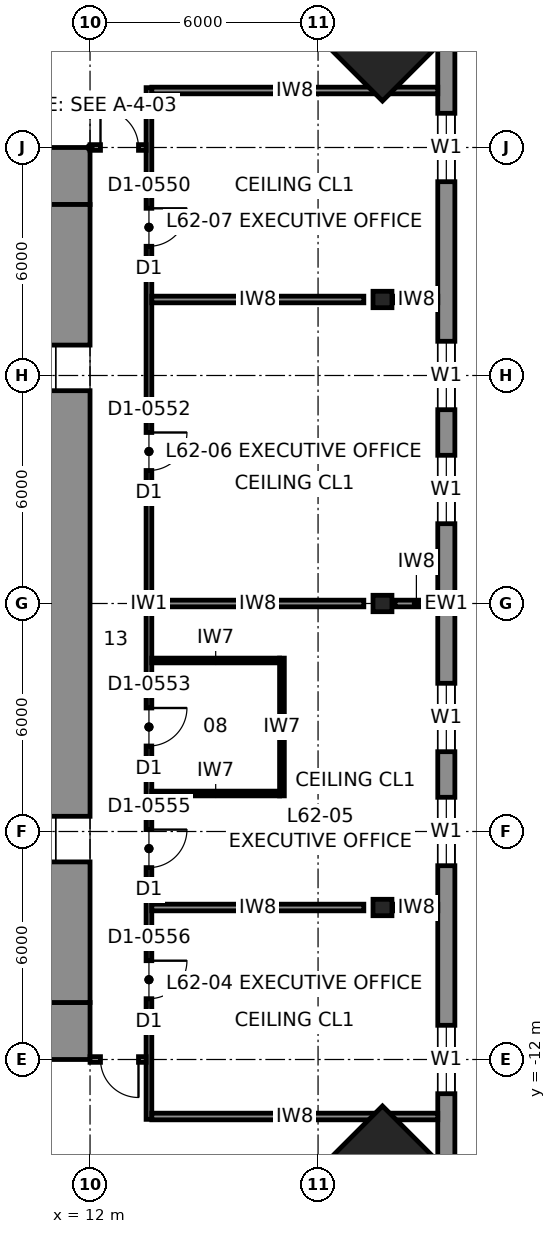
"""IFC4 building model, lengths in metres.
Left out: names, types, materials, properties, quantities, classifications, styles, units other than length and angle.
Written with IfcOpenShell. Run it as: python <this file> out.ifc"""

import sys

from ifc_helpers import new_model, si_unit, direction, frame, frame_2d, origin, origin_2d, place, context, subcontext, project, spatial, rectangle, i_section, extrude, element, fill, save


model = new_model("IFC4")
c1 = context("Model", 3, precision=1e-05, world=origin(), true_north=direction((0.0, 1.0)))
c2 = subcontext(c1, "Body", "Model", "MODEL_VIEW")
j1 = project(units=[si_unit("LENGTHUNIT", "METRE"), si_unit("PLANEANGLEUNIT", "RADIAN")], contexts=[c1])
p1 = place(None, origin())
s1 = spatial("IfcSite", under=j1, at=p1, CompositionType="ELEMENT")
p2 = place(p1, origin())
s2 = spatial("IfcBuilding", under=s1, at=p2, CompositionType="ELEMENT")
p3 = place(p2, frame((0.0, 0.0, 277.8)))
s3 = spatial("IfcBuildingStorey", under=s2, at=p3, CompositionType="ELEMENT", Elevation=277.8)
for number, where, z_axis, x_axis in (
    (1, (19.695, 15.345, 0.0), (-0.04, -0.04, 0.998), (0.708, -0.707, 0.0)),
    (2, (19.695, -15.345, 0.0), (-0.04, 0.04, 0.998), (-0.708, -0.707, 0.0)),
):
    element("IfcColumn", number, at=place(p3, frame(where, z_axis=z_axis, x_axis=x_axis)), inside=s3, PredefinedType="COLUMN", context=c2, shape_type="SweptSolid", body=[
        extrude(rectangle(XDim=3.0, YDim=3.0, at=origin_2d()), origin(), (0.0, 0.0, 1.0), 4.007),
    ])
for number, where, z_axis, x_axis in (
    (3, (19.695, 0.0, 0.0), (-0.04, 0.0, 0.999), (0.0, -1.0, 0.0)),
    (4, (19.695, -8.0, 0.0), (-0.04, 0.0, 0.999), (0.0, -1.0, 0.0)),
    (5, (19.695, 8.0, 0.0), (-0.04, 0.0, 0.999), (0.0, -1.0, 0.0)),
):
    element("IfcColumn", number, at=place(p3, frame(where, z_axis=z_axis, x_axis=x_axis)), inside=s3, PredefinedType="COLUMN", context=c2, shape_type="SweptSolid", body=[
        extrude(i_section(OverallWidth=0.432, OverallDepth=0.498, WebThickness=0.056, FlangeThickness=0.089, at=origin_2d()), origin(), (0.0, 0.0, 1.0), 4.003),
    ])
for number, where, z_axis, x_axis in (
    (6, (-12.0, 11.25, 0.0), (0.0, 0.0, 1.0), (1.0, 0.0, 0.0)),
    (7, (12.0, -11.25, 0.0), (0.0, 0.0, 1.0), (-1.0, 0.0, 0.0)),
):
    element("IfcWall", number, at=place(p3, frame(where, z_axis=z_axis, x_axis=x_axis)), inside=s3, PredefinedType="SHEAR", context=c2, shape_type="SweptSolid", body=[
        extrude(rectangle(XDim=24.0, YDim=1.5, at=frame_2d((12.0, 0.0))), origin(), (0.0, 0.0, 1.0), 4.0),
    ])
p4 = place(p3, frame((11.25, 10.5, 0.0), z_axis=(0.0, 0.0, 1.0), x_axis=(0.0, -1.0, 0.0)))
e8 = element("IfcWall", 8, at=p4, inside=s3, PredefinedType="SHEAR", context=c2, shape_type="SweptSolid", body=[
    extrude(rectangle(XDim=21.0, YDim=1.5, at=frame_2d((10.5, 0.0))), origin(), (0.0, 0.0, 1.0), 4.0),
])
p5 = place(p4, frame((3.7, 0.0, 0.0)))
e9 = element("IfcOpeningElement", 9, at=p5, cuts=e8, PredefinedType="OPENING", context=c2, shape_type="SweptSolid", body=[
    extrude(rectangle(XDim=1.2, YDim=2.3, at=frame_2d((0.6, 1.15))), frame((0.0, 0.76, 0.0), z_axis=(0.0, -1.0, 0.0), x_axis=(1.0, 0.0, 0.0)), (0.0, 0.0, 1.0), 1.52),
])
p6 = place(p4, frame((16.1, 0.0, 0.0)))
e10 = element("IfcOpeningElement", 10, at=p6, cuts=e8, PredefinedType="OPENING", context=c2, shape_type="SweptSolid", body=[
    extrude(rectangle(XDim=1.2, YDim=2.3, at=frame_2d((0.6, 1.15))), frame((0.0, 0.76, 0.0), z_axis=(0.0, -1.0, 0.0), x_axis=(1.0, 0.0, 0.0)), (0.0, 0.0, 1.0), 1.52),
])
p7 = place(p3, frame((21.375, -17.1, 0.0), z_axis=(0.0, 0.0, 1.0), x_axis=(0.0, 1.0, 0.0)))
e11 = element("IfcWall", 11, at=p7, inside=s3, PredefinedType="SOLIDWALL", context=c2, shape_type="SweptSolid", body=[
    extrude(rectangle(XDim=34.2, YDim=0.45, at=frame_2d((17.1, 0.0))), origin(), (0.0, 0.0, 1.0), 3.83),
])
p8 = place(p7, frame((4.2, 0.0, 0.7)))
e12 = element("IfcOpeningElement", 12, at=p8, cuts=e11, PredefinedType="OPENING", context=c2, shape_type="SweptSolid", body=[
    extrude(rectangle(XDim=1.8, YDim=2.6, at=frame_2d((0.9, 1.3))), frame((0.0, 0.235, 0.0), z_axis=(0.0, -1.0, 0.0), x_axis=(1.0, 0.0, 0.0)), (0.0, 0.0, 1.0), 0.47),
])
p9 = place(p7, frame((10.2, 0.0, 0.7)))
e13 = element("IfcOpeningElement", 13, at=p9, cuts=e11, PredefinedType="OPENING", context=c2, shape_type="SweptSolid", body=[
    extrude(rectangle(XDim=1.8, YDim=2.6, at=frame_2d((0.9, 1.3))), frame((0.0, 0.235, 0.0), z_axis=(0.0, -1.0, 0.0), x_axis=(1.0, 0.0, 0.0)), (0.0, 0.0, 1.0), 0.47),
])
p10 = place(p7, frame((13.2, 0.0, 0.7)))
e14 = element("IfcOpeningElement", 14, at=p10, cuts=e11, PredefinedType="OPENING", context=c2, shape_type="SweptSolid", body=[
    extrude(rectangle(XDim=1.8, YDim=2.6, at=frame_2d((0.9, 1.3))), frame((0.0, 0.235, 0.0), z_axis=(0.0, -1.0, 0.0), x_axis=(1.0, 0.0, 0.0)), (0.0, 0.0, 1.0), 0.47),
])
p11 = place(p7, frame((19.2, 0.0, 0.7)))
e15 = element("IfcOpeningElement", 15, at=p11, cuts=e11, PredefinedType="OPENING", context=c2, shape_type="SweptSolid", body=[
    extrude(rectangle(XDim=1.8, YDim=2.6, at=frame_2d((0.9, 1.3))), frame((0.0, 0.235, 0.0), z_axis=(0.0, -1.0, 0.0), x_axis=(1.0, 0.0, 0.0)), (0.0, 0.0, 1.0), 0.47),
])
p12 = place(p7, frame((22.2, 0.0, 0.7)))
e16 = element("IfcOpeningElement", 16, at=p12, cuts=e11, PredefinedType="OPENING", context=c2, shape_type="SweptSolid", body=[
    extrude(rectangle(XDim=1.8, YDim=2.6, at=frame_2d((0.9, 1.3))), frame((0.0, 0.235, 0.0), z_axis=(0.0, -1.0, 0.0), x_axis=(1.0, 0.0, 0.0)), (0.0, 0.0, 1.0), 0.47),
])
p13 = place(p7, frame((28.2, 0.0, 0.7)))
e17 = element("IfcOpeningElement", 17, at=p13, cuts=e11, PredefinedType="OPENING", context=c2, shape_type="SweptSolid", body=[
    extrude(rectangle(XDim=1.8, YDim=2.6, at=frame_2d((0.9, 1.3))), frame((0.0, 0.235, 0.0), z_axis=(0.0, -1.0, 0.0), x_axis=(1.0, 0.0, 0.0)), (0.0, 0.0, 1.0), 0.47),
])
p14 = place(p3, frame((13.55, -13.575, 0.0), z_axis=(0.0, 0.0, 1.0), x_axis=(0.0, 1.0, 0.0)))
e18 = element("IfcWall", 18, at=p14, inside=s3, PredefinedType="PARTITIONING", context=c2, shape_type="SweptSolid", body=[
    extrude(rectangle(XDim=27.15, YDim=0.15, at=frame_2d((13.575, 0.0))), origin(), (0.0, 0.0, 1.0), 3.83),
])
p15 = place(p14, frame((3.175, 0.0, 0.0)))
e19 = element("IfcOpeningElement", 19, at=p15, cuts=e18, PredefinedType="OPENING", context=c2, shape_type="SweptSolid", body=[
    extrude(rectangle(XDim=1.0, YDim=2.3, at=frame_2d((0.5, 1.15))), frame((0.0, 0.085, 0.0), z_axis=(0.0, -1.0, 0.0), x_axis=(1.0, 0.0, 0.0)), (0.0, 0.0, 1.0), 0.17),
])
p16 = place(p14, frame((6.625, 0.0, 0.0)))
e20 = element("IfcOpeningElement", 20, at=p16, cuts=e18, PredefinedType="OPENING", context=c2, shape_type="SweptSolid", body=[
    extrude(rectangle(XDim=1.0, YDim=2.3, at=frame_2d((0.5, 1.15))), frame((0.0, 0.085, 0.0), z_axis=(0.0, -1.0, 0.0), x_axis=(1.0, 0.0, 0.0)), (0.0, 0.0, 1.0), 0.17),
])
p17 = place(p14, frame((17.075, 0.0, 0.0)))
e21 = element("IfcOpeningElement", 21, at=p17, cuts=e18, PredefinedType="OPENING", context=c2, shape_type="SweptSolid", body=[
    extrude(rectangle(XDim=1.0, YDim=2.3, at=frame_2d((0.5, 1.15))), frame((0.0, 0.085, 0.0), z_axis=(0.0, -1.0, 0.0), x_axis=(1.0, 0.0, 0.0)), (0.0, 0.0, 1.0), 0.17),
])
p18 = place(p14, frame((22.975, 0.0, 0.0)))
e22 = element("IfcOpeningElement", 22, at=p18, cuts=e18, PredefinedType="OPENING", context=c2, shape_type="SweptSolid", body=[
    extrude(rectangle(XDim=1.0, YDim=2.3, at=frame_2d((0.5, 1.15))), frame((0.0, 0.085, 0.0), z_axis=(0.0, -1.0, 0.0), x_axis=(1.0, 0.0, 0.0)), (0.0, 0.0, 1.0), 0.17),
])
p19 = place(p14, frame((9.825, 0.0, 0.0)))
e23 = element("IfcOpeningElement", 23, at=p19, cuts=e18, PredefinedType="OPENING", context=c2, shape_type="SweptSolid", body=[
    extrude(rectangle(XDim=1.0, YDim=2.3, at=frame_2d((0.5, 1.15))), frame((0.0, 0.085, 0.0), z_axis=(0.0, -1.0, 0.0), x_axis=(1.0, 0.0, 0.0)), (0.0, 0.0, 1.0), 0.17),
])
p20 = place(p3, frame((12.0, 12.0, 0.0), z_axis=(0.0, 0.0, 1.0), x_axis=(1.0, 0.0, 0.0)))
e24 = element("IfcWall", 24, at=p20, inside=s3, PredefinedType="PARTITIONING", context=c2, shape_type="SweptSolid", body=[
    extrude(rectangle(XDim=1.475, YDim=0.15, at=frame_2d((0.738, 0.0))), origin(), (0.0, 0.0, 1.0), 3.83),
])
p21 = place(p20, frame((0.275, 0.0, 0.0)))
e25 = element("IfcOpeningElement", 25, at=p21, cuts=e24, PredefinedType="OPENING", context=c2, shape_type="SweptSolid", body=[
    extrude(rectangle(XDim=1.0, YDim=2.3, at=frame_2d((0.5, 1.15))), frame((0.0, 0.085, 0.0), z_axis=(0.0, -1.0, 0.0), x_axis=(1.0, 0.0, 0.0)), (0.0, 0.0, 1.0), 0.17),
])
p22 = place(p3, frame((13.475, -12.0, 0.0), z_axis=(0.0, 0.0, 1.0), x_axis=(-1.0, 0.0, 0.0)))
e26 = element("IfcWall", 26, at=p22, inside=s3, PredefinedType="PARTITIONING", context=c2, shape_type="SweptSolid", body=[
    extrude(rectangle(XDim=1.475, YDim=0.15, at=frame_2d((0.738, 0.0))), origin(), (0.0, 0.0, 1.0), 3.83),
])
p23 = place(p22, frame((0.2, 0.0, 0.0)))
e27 = element("IfcOpeningElement", 27, at=p23, cuts=e26, PredefinedType="OPENING", context=c2, shape_type="SweptSolid", body=[
    extrude(rectangle(XDim=1.0, YDim=2.3, at=frame_2d((0.5, 1.15))), frame((0.0, 0.085, 0.0), z_axis=(0.0, -1.0, 0.0), x_axis=(1.0, 0.0, 0.0)), (0.0, 0.0, 1.0), 0.17),
])
for number, where, z_axis, x_axis in (
    (28, (13.625, 13.5, 0.0), (0.0, 0.0, 1.0), (1.0, 0.0, 0.0)),
    (29, (21.15, -13.5, 0.0), (0.0, 0.0, 1.0), (-1.0, 0.0, 0.0)),
):
    element("IfcWall", number, at=place(p3, frame(where, z_axis=z_axis, x_axis=x_axis)), inside=s3, PredefinedType="PARTITIONING", context=c2, shape_type="SweptSolid", body=[
        extrude(rectangle(XDim=7.525, YDim=0.175, at=frame_2d((3.762, 0.0))), origin(), (0.0, 0.0, 1.0), 3.83),
    ])
p24 = place(p3, frame((13.625, -8.0, 0.0), z_axis=(0.0, 0.0, 1.0), x_axis=(1.0, 0.0, 0.0)))
e30 = element("IfcWall", 30, at=p24, inside=s3, PredefinedType="PARTITIONING", context=c2, shape_type="SweptSolid", body=[
    extrude(rectangle(XDim=5.579, YDim=0.175, at=frame_2d((2.79, 0.0))), origin(), (0.0, 0.0, 1.0), 3.24),
])
p25 = place(p3, frame((20.025, -8.0, 0.0), z_axis=(0.0, 0.0, 1.0), x_axis=(1.0, 0.0, 0.0)))
e31 = element("IfcWall", 31, at=p25, inside=s3, PredefinedType="PARTITIONING", context=c2, shape_type="SweptSolid", body=[
    extrude(rectangle(XDim=1.125, YDim=0.175, at=frame_2d((0.562, 0.0))), origin(), (0.0, 0.0, 1.0), 3.83),
])
p26 = place(p3, frame((13.625, 0.0, 0.0), z_axis=(0.0, 0.0, 1.0), x_axis=(1.0, 0.0, 0.0)))
e32 = element("IfcWall", 32, at=p26, inside=s3, PredefinedType="PARTITIONING", context=c2, shape_type="SweptSolid", body=[
    extrude(rectangle(XDim=5.579, YDim=0.175, at=frame_2d((2.79, 0.0))), origin(), (0.0, 0.0, 1.0), 3.24),
])
p27 = place(p3, frame((20.025, 0.0, 0.0), z_axis=(0.0, 0.0, 1.0), x_axis=(1.0, 0.0, 0.0)))
e33 = element("IfcWall", 33, at=p27, inside=s3, PredefinedType="PARTITIONING", context=c2, shape_type="SweptSolid", body=[
    extrude(rectangle(XDim=1.125, YDim=0.175, at=frame_2d((0.562, 0.0))), origin(), (0.0, 0.0, 1.0), 3.83),
])
p28 = place(p3, frame((13.625, 8.0, 0.0), z_axis=(0.0, 0.0, 1.0), x_axis=(1.0, 0.0, 0.0)))
e34 = element("IfcWall", 34, at=p28, inside=s3, PredefinedType="PARTITIONING", context=c2, shape_type="SweptSolid", body=[
    extrude(rectangle(XDim=5.579, YDim=0.175, at=frame_2d((2.79, 0.0))), origin(), (0.0, 0.0, 1.0), 3.24),
])
p29 = place(p3, frame((20.025, 8.0, 0.0), z_axis=(0.0, 0.0, 1.0), x_axis=(1.0, 0.0, 0.0)))
e35 = element("IfcWall", 35, at=p29, inside=s3, PredefinedType="PARTITIONING", context=c2, shape_type="SweptSolid", body=[
    extrude(rectangle(XDim=1.125, YDim=0.175, at=frame_2d((0.562, 0.0))), origin(), (0.0, 0.0, 1.0), 3.83),
])
p30 = place(p3, frame((17.05, -5.062, 0.0), z_axis=(0.0, 0.0, 1.0), x_axis=(0.0, 1.0, 0.0)))
e36 = element("IfcWall", 36, at=p30, inside=s3, PredefinedType="PARTITIONING", context=c2, shape_type="SweptSolid", body=[
    extrude(rectangle(XDim=3.625, YDim=0.125, at=frame_2d((1.812, 0.0))), origin(), (0.0, 0.0, 1.0), 3.83),
])
for number, where, z_axis, x_axis in (
    (37, (13.625, -5.0, 0.0), (0.0, 0.0, 1.0), (1.0, 0.0, 0.0)),
    (38, (13.625, -1.5, 0.0), (0.0, 0.0, 1.0), (1.0, 0.0, 0.0)),
):
    element("IfcWall", number, at=place(p3, frame(where, z_axis=z_axis, x_axis=x_axis)), inside=s3, PredefinedType="PARTITIONING", context=c2, shape_type="SweptSolid", body=[
        extrude(rectangle(XDim=3.363, YDim=0.125, at=frame_2d((1.681, 0.0))), origin(), (0.0, 0.0, 1.0), 3.83),
    ])
p31 = place(p8, origin())
e39 = element("IfcWindow", 39, at=p31, inside=s3, PartitioningType="SINGLE_PANEL", PredefinedType="WINDOW", context=c2, shape_type="SweptSolid", body=[
    extrude(rectangle(XDim=1.8, YDim=2.6, at=frame_2d((0.9, 1.3))), frame((0.0, 0.03, 0.0), z_axis=(0.0, -1.0, 0.0), x_axis=(1.0, 0.0, 0.0)), (0.0, 0.0, 1.0), 0.06),
])
fill(e12, e39)
p32 = place(p9, origin())
e40 = element("IfcWindow", 40, at=p32, inside=s3, PartitioningType="SINGLE_PANEL", PredefinedType="WINDOW", context=c2, shape_type="SweptSolid", body=[
    extrude(rectangle(XDim=1.8, YDim=2.6, at=frame_2d((0.9, 1.3))), frame((0.0, 0.03, 0.0), z_axis=(0.0, -1.0, 0.0), x_axis=(1.0, 0.0, 0.0)), (0.0, 0.0, 1.0), 0.06),
])
fill(e13, e40)
p33 = place(p10, origin())
e41 = element("IfcWindow", 41, at=p33, inside=s3, PartitioningType="SINGLE_PANEL", PredefinedType="WINDOW", context=c2, shape_type="SweptSolid", body=[
    extrude(rectangle(XDim=1.8, YDim=2.6, at=frame_2d((0.9, 1.3))), frame((0.0, 0.03, 0.0), z_axis=(0.0, -1.0, 0.0), x_axis=(1.0, 0.0, 0.0)), (0.0, 0.0, 1.0), 0.06),
])
fill(e14, e41)
p34 = place(p11, origin())
e42 = element("IfcWindow", 42, at=p34, inside=s3, PartitioningType="SINGLE_PANEL", PredefinedType="WINDOW", context=c2, shape_type="SweptSolid", body=[
    extrude(rectangle(XDim=1.8, YDim=2.6, at=frame_2d((0.9, 1.3))), frame((0.0, 0.03, 0.0), z_axis=(0.0, -1.0, 0.0), x_axis=(1.0, 0.0, 0.0)), (0.0, 0.0, 1.0), 0.06),
])
fill(e15, e42)
p35 = place(p12, origin())
e43 = element("IfcWindow", 43, at=p35, inside=s3, PartitioningType="SINGLE_PANEL", PredefinedType="WINDOW", context=c2, shape_type="SweptSolid", body=[
    extrude(rectangle(XDim=1.8, YDim=2.6, at=frame_2d((0.9, 1.3))), frame((0.0, 0.03, 0.0), z_axis=(0.0, -1.0, 0.0), x_axis=(1.0, 0.0, 0.0)), (0.0, 0.0, 1.0), 0.06),
])
fill(e16, e43)
p36 = place(p13, origin())
e44 = element("IfcWindow", 44, at=p36, inside=s3, PartitioningType="SINGLE_PANEL", PredefinedType="WINDOW", context=c2, shape_type="SweptSolid", body=[
    extrude(rectangle(XDim=1.8, YDim=2.6, at=frame_2d((0.9, 1.3))), frame((0.0, 0.03, 0.0), z_axis=(0.0, -1.0, 0.0), x_axis=(1.0, 0.0, 0.0)), (0.0, 0.0, 1.0), 0.06),
])
fill(e17, e44)
p37 = place(p21, origin())
e45 = element("IfcDoor", 45, at=p37, inside=s3, OperationType="SINGLE_SWING_LEFT", PredefinedType="DOOR", context=c2, shape_type="SweptSolid", body=[
    extrude(rectangle(XDim=1.0, YDim=2.3, at=frame_2d((0.5, 1.15))), frame((0.0, 0.025, 0.0), z_axis=(0.0, -1.0, 0.0), x_axis=(1.0, 0.0, 0.0)), (0.0, 0.0, 1.0), 0.05),
])
fill(e25, e45)
p38 = place(p23, origin())
e46 = element("IfcDoor", 46, at=p38, inside=s3, OperationType="SINGLE_SWING_LEFT", PredefinedType="DOOR", context=c2, shape_type="SweptSolid", body=[
    extrude(rectangle(XDim=1.0, YDim=2.3, at=frame_2d((0.5, 1.15))), frame((0.0, 0.025, 0.0), z_axis=(0.0, -1.0, 0.0), x_axis=(1.0, 0.0, 0.0)), (0.0, 0.0, 1.0), 0.05),
])
fill(e27, e46)
p39 = place(p15, frame((1.0, 0.0, 0.0), z_axis=(0.0, 0.0, 1.0), x_axis=(-1.0, 0.0, 0.0)))
e47 = element("IfcDoor", 47, at=p39, inside=s3, OperationType="SINGLE_SWING_LEFT", PredefinedType="DOOR", context=c2, shape_type="SweptSolid", body=[
    extrude(rectangle(XDim=1.0, YDim=2.3, at=frame_2d((0.5, 1.15))), frame((0.0, 0.025, 0.0), z_axis=(0.0, -1.0, 0.0), x_axis=(1.0, 0.0, 0.0)), (0.0, 0.0, 1.0), 0.05),
])
fill(e19, e47)
p40 = place(p16, frame((1.0, 0.0, 0.0), z_axis=(0.0, 0.0, 1.0), x_axis=(-1.0, 0.0, 0.0)))
e48 = element("IfcDoor", 48, at=p40, inside=s3, OperationType="SINGLE_SWING_LEFT", PredefinedType="DOOR", context=c2, shape_type="SweptSolid", body=[
    extrude(rectangle(XDim=1.0, YDim=2.3, at=frame_2d((0.5, 1.15))), frame((0.0, 0.025, 0.0), z_axis=(0.0, -1.0, 0.0), x_axis=(1.0, 0.0, 0.0)), (0.0, 0.0, 1.0), 0.05),
])
fill(e20, e48)
p41 = place(p17, frame((1.0, 0.0, 0.0), z_axis=(0.0, 0.0, 1.0), x_axis=(-1.0, 0.0, 0.0)))
e49 = element("IfcDoor", 49, at=p41, inside=s3, OperationType="SINGLE_SWING_LEFT", PredefinedType="DOOR", context=c2, shape_type="SweptSolid", body=[
    extrude(rectangle(XDim=1.0, YDim=2.3, at=frame_2d((0.5, 1.15))), frame((0.0, 0.025, 0.0), z_axis=(0.0, -1.0, 0.0), x_axis=(1.0, 0.0, 0.0)), (0.0, 0.0, 1.0), 0.05),
])
fill(e21, e49)
p42 = place(p18, frame((1.0, 0.0, 0.0), z_axis=(0.0, 0.0, 1.0), x_axis=(-1.0, 0.0, 0.0)))
e50 = element("IfcDoor", 50, at=p42, inside=s3, OperationType="SINGLE_SWING_LEFT", PredefinedType="DOOR", context=c2, shape_type="SweptSolid", body=[
    extrude(rectangle(XDim=1.0, YDim=2.3, at=frame_2d((0.5, 1.15))), frame((0.0, 0.025, 0.0), z_axis=(0.0, -1.0, 0.0), x_axis=(1.0, 0.0, 0.0)), (0.0, 0.0, 1.0), 0.05),
])
fill(e22, e50)
p43 = place(p19, frame((1.0, 0.0, 0.0), z_axis=(0.0, 0.0, 1.0), x_axis=(-1.0, 0.0, 0.0)))
e51 = element("IfcDoor", 51, at=p43, inside=s3, OperationType="SINGLE_SWING_LEFT", PredefinedType="DOOR", context=c2, shape_type="SweptSolid", body=[
    extrude(rectangle(XDim=1.0, YDim=2.3, at=frame_2d((0.5, 1.15))), frame((0.0, 0.025, 0.0), z_axis=(0.0, -1.0, 0.0), x_axis=(1.0, 0.0, 0.0)), (0.0, 0.0, 1.0), 0.05),
])
fill(e23, e51)
p44 = place(p5, frame((1.2, 0.0, 0.0), z_axis=(0.0, 0.0, 1.0), x_axis=(-1.0, 0.0, 0.0)))
e52 = element("IfcDoor", 52, at=p44, inside=s3, OperationType="SINGLE_SWING_LEFT", PredefinedType="DOOR", context=c2, shape_type="SweptSolid", body=[
    extrude(rectangle(XDim=1.2, YDim=2.3, at=frame_2d((0.6, 1.15))), frame((0.0, 0.025, 0.0), z_axis=(0.0, -1.0, 0.0), x_axis=(1.0, 0.0, 0.0)), (0.0, 0.0, 1.0), 0.05),
])
fill(e9, e52)
p45 = place(p6, frame((1.2, 0.0, 0.0), z_axis=(0.0, 0.0, 1.0), x_axis=(-1.0, 0.0, 0.0)))
e53 = element("IfcDoor", 53, at=p45, inside=s3, OperationType="SINGLE_SWING_LEFT", PredefinedType="DOOR", context=c2, shape_type="SweptSolid", body=[
    extrude(rectangle(XDim=1.2, YDim=2.3, at=frame_2d((0.6, 1.15))), frame((0.0, 0.025, 0.0), z_axis=(0.0, -1.0, 0.0), x_axis=(1.0, 0.0, 0.0)), (0.0, 0.0, 1.0), 0.05),
])
fill(e10, e53)
save(model, sys.argv[1])
